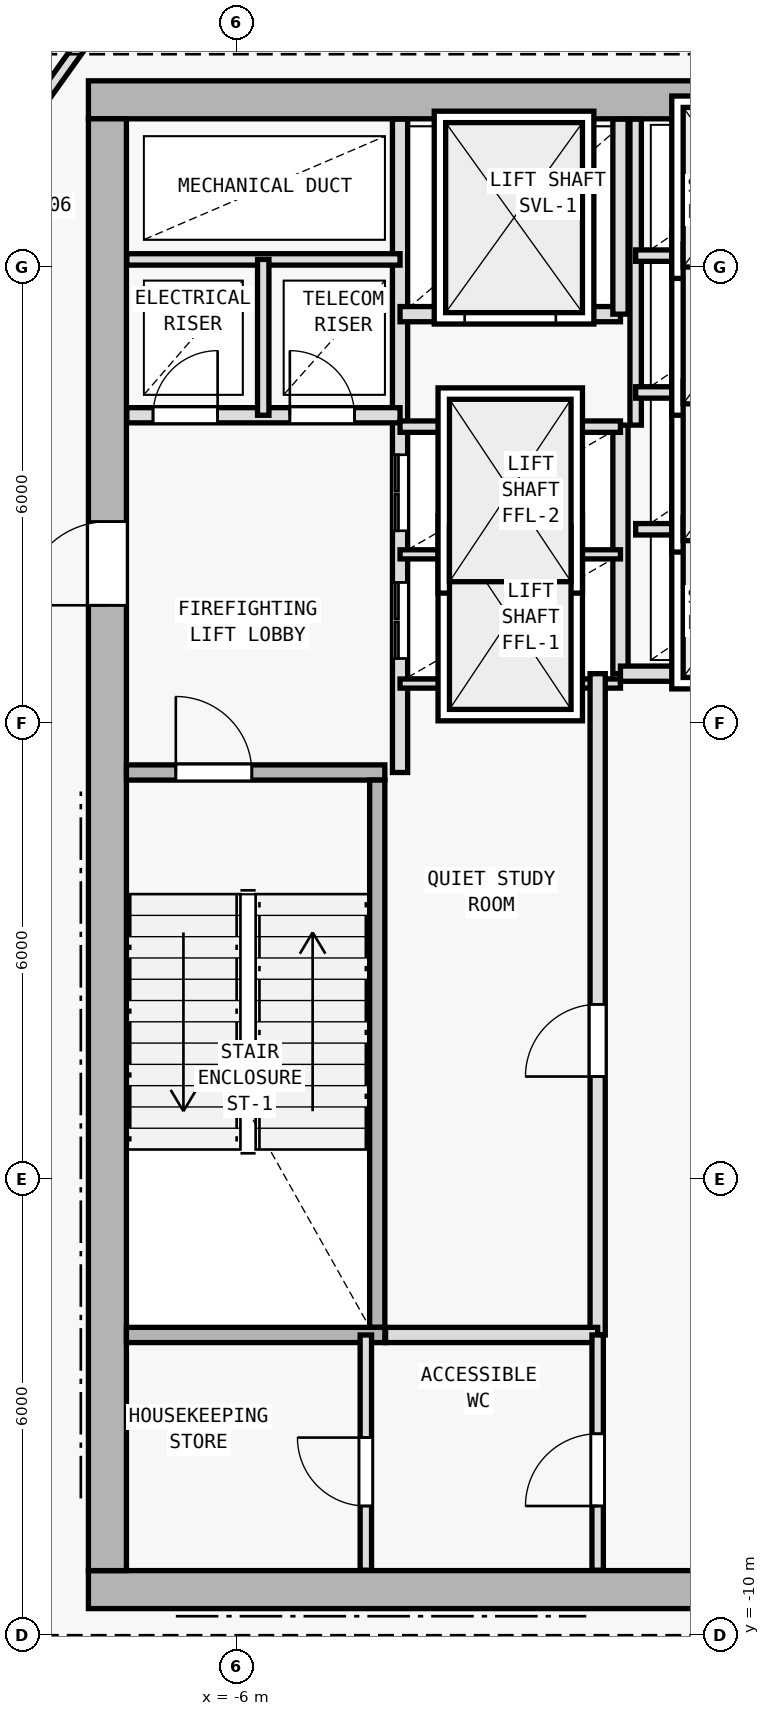
"""IFC4 building model, lengths in metres.
Left out: names, types, materials, properties, quantities, classifications, styles, units other than length and angle.
Written with IfcOpenShell. Run it as: python <this file> out.ifc"""

import sys

from ifc_helpers import new_model, si_unit, direction, frame, frame_2d, origin, origin_2d, place, context, subcontext, project, spatial, rectangle, i_section, extrude, element, fill, save


model = new_model("IFC4")
c1 = context("Model", 3, precision=1e-05, world=origin(), true_north=direction((0.0, 1.0)))
c2 = subcontext(c1, "Body", "Model", "MODEL_VIEW")
j1 = project(units=[si_unit("LENGTHUNIT", "METRE"), si_unit("PLANEANGLEUNIT", "RADIAN")], contexts=[c1])
p1 = place(None, origin())
s1 = spatial("IfcSite", under=j1, at=p1, CompositionType="ELEMENT")
p2 = place(p1, origin())
s2 = spatial("IfcBuilding", under=s1, at=p2, CompositionType="ELEMENT")
p3 = place(p2, frame((0.0, 0.0, 246.3)))
s3 = spatial("IfcBuildingStorey", under=s2, at=p3, CompositionType="ELEMENT", Elevation=246.3)
for number, where, z_axis, x_axis in (
    (1, (-7.7, -9.4, 0.0), (0.0, 0.0, 1.0), (1.0, 0.0, 0.0)),
    (2, (-7.7, 10.2, 0.0), (0.0, 0.0, 1.0), (1.0, 0.0, 0.0)),
    (3, (0.0, -9.4, 0.0), (0.0, 0.0, 1.0), (1.0, 0.0, 0.0)),
    (4, (-7.7, 2.0, 0.0), (0.0, 0.0, 1.0), (1.0, 0.0, 0.0)),
):
    element("IfcColumn", number, at=place(p3, frame(where, z_axis=z_axis, x_axis=x_axis)), inside=s3, PredefinedType="COLUMN", context=c2, shape_type="SweptSolid", body=[
        extrude(i_section(OverallWidth=0.398, OverallDepth=0.387, WebThickness=0.013, FlangeThickness=0.022, FilletRadius=0.015, at=origin_2d()), origin(), (0.0, 0.0, 1.0), 4.5),
    ])
p4 = place(p3, frame((-7.95, -9.4, 0.0), z_axis=(0.0, 0.0, 1.0), x_axis=(1.0, 0.0, 0.0)))
e5 = element("IfcWall", 5, at=p4, inside=s3, PredefinedType="SHEAR", context=c2, shape_type="SweptSolid", body=[
    extrude(rectangle(XDim=15.9, YDim=0.5, at=frame_2d((7.95, 0.0))), origin(), (0.0, 0.0, 1.0), 4.25),
])
p5 = place(p4, frame((9.6, 0.0, 0.0)))
e6 = element("IfcOpeningElement", 6, at=p5, cuts=e5, PredefinedType="OPENING", context=c2, shape_type="SweptSolid", body=[
    extrude(rectangle(XDim=1.5, YDim=2.2, at=frame_2d((0.75, 1.1))), frame((0.0, 0.26, 0.0), z_axis=(0.0, -1.0, 0.0), x_axis=(1.0, 0.0, 0.0)), (0.0, 0.0, 1.0), 0.52),
])
p6 = place(p3, frame((7.95, 10.2, 0.0), z_axis=(0.0, 0.0, 1.0), x_axis=(-1.0, 0.0, 0.0)))
e7 = element("IfcWall", 7, at=p6, inside=s3, PredefinedType="SHEAR", context=c2, shape_type="SweptSolid", body=[
    extrude(rectangle(XDim=15.9, YDim=0.5, at=frame_2d((7.95, 0.0))), origin(), (0.0, 0.0, 1.0), 4.25),
])
p7 = place(p6, frame((4.4, 0.0, 0.0)))
e8 = element("IfcOpeningElement", 8, at=p7, cuts=e7, PredefinedType="OPENING", context=c2, shape_type="SweptSolid", body=[
    extrude(rectangle(XDim=1.1, YDim=2.15, at=frame_2d((0.55, 1.075))), frame((0.0, 0.26, 0.0), z_axis=(0.0, -1.0, 0.0), x_axis=(1.0, 0.0, 0.0)), (0.0, 0.0, 1.0), 0.52),
])
p8 = place(p3, frame((-7.7, -9.15, 0.0), z_axis=(0.0, 0.0, 1.0), x_axis=(0.0, 1.0, 0.0)))
e9 = element("IfcWall", 9, at=p8, inside=s3, PredefinedType="SHEAR", context=c2, shape_type="SweptSolid", body=[
    extrude(rectangle(XDim=19.1, YDim=0.5, at=frame_2d((9.55, 0.0))), origin(), (0.0, 0.0, 1.0), 4.25),
])
p9 = place(p8, frame((12.7, 0.0, 0.0)))
e10 = element("IfcOpeningElement", 10, at=p9, cuts=e9, PredefinedType="OPENING", context=c2, shape_type="SweptSolid", body=[
    extrude(rectangle(XDim=1.1, YDim=2.15, at=frame_2d((0.55, 1.075))), frame((0.0, 0.26, 0.0), z_axis=(0.0, -1.0, 0.0), x_axis=(1.0, 0.0, 0.0)), (0.0, 0.0, 1.0), 0.52),
])
p10 = place(p3, frame((-7.45, 1.35, 0.0), z_axis=(0.0, 0.0, 1.0), x_axis=(1.0, 0.0, 0.0)))
e11 = element("IfcWall", 11, at=p10, inside=s3, PredefinedType="SOLIDWALL", context=c2, shape_type="SweptSolid", body=[
    extrude(rectangle(XDim=3.4, YDim=0.2, at=frame_2d((1.7, 0.0))), origin(), (0.0, 0.0, 1.0), 4.25),
])
p11 = place(p10, frame((0.65, 0.0, 0.0)))
e12 = element("IfcOpeningElement", 12, at=p11, cuts=e11, PredefinedType="OPENING", context=c2, shape_type="SweptSolid", body=[
    extrude(rectangle(XDim=1.0, YDim=2.15, at=frame_2d((0.5, 1.075))), frame((0.0, 0.11, 0.0), z_axis=(0.0, -1.0, 0.0), x_axis=(1.0, 0.0, 0.0)), (0.0, 0.0, 1.0), 0.22),
])
p12 = place(p3, frame((-4.15, -5.95, 0.0), z_axis=(0.0, 0.0, 1.0), x_axis=(0.0, 1.0, 0.0)))
e13 = element("IfcWall", 13, at=p12, inside=s3, PredefinedType="SOLIDWALL", context=c2, shape_type="SweptSolid", body=[
    extrude(rectangle(XDim=7.2, YDim=0.2, at=frame_2d((3.6, 0.0))), origin(), (0.0, 0.0, 1.0), 4.25),
])
p13 = place(p3, frame((-3.85, 1.35, 0.0), z_axis=(0.0, 0.0, 1.0), x_axis=(0.0, 1.0, 0.0)))
e14 = element("IfcWall", 14, at=p13, inside=s3, PredefinedType="SOLIDWALL", context=c2, shape_type="SweptSolid", body=[
    extrude(rectangle(XDim=8.595, YDim=0.2, at=frame_2d((4.297, 0.0))), origin(), (0.0, 0.0, 1.0), 4.25),
])
p14 = place(p13, frame((1.5, 0.0, 0.0)))
e15 = element("IfcOpeningElement", 15, at=p14, cuts=e14, PredefinedType="OPENING", context=c2, shape_type="SweptSolid", body=[
    extrude(rectangle(XDim=1.0, YDim=2.15, at=frame_2d((0.5, 1.075))), frame((0.0, 0.11, 0.0), z_axis=(0.0, -1.0, 0.0), x_axis=(1.0, 0.0, 0.0)), (0.0, 0.0, 1.0), 0.22),
])
p15 = place(p13, frame((3.18, 0.0, 0.0)))
e16 = element("IfcOpeningElement", 16, at=p15, cuts=e14, PredefinedType="OPENING", context=c2, shape_type="SweptSolid", body=[
    extrude(rectangle(XDim=1.0, YDim=2.15, at=frame_2d((0.5, 1.075))), frame((0.0, 0.11, 0.0), z_axis=(0.0, -1.0, 0.0), x_axis=(1.0, 0.0, 0.0)), (0.0, 0.0, 1.0), 0.22),
])
p16 = place(p3, frame((-7.445, 6.05, 0.0), z_axis=(0.0, 0.0, 1.0), x_axis=(1.0, 0.0, 0.0)))
e17 = element("IfcWall", 17, at=p16, inside=s3, PredefinedType="SOLIDWALL", context=c2, shape_type="SweptSolid", body=[
    extrude(rectangle(XDim=3.595, YDim=0.2, at=frame_2d((1.797, 0.0))), origin(), (0.0, 0.0, 1.0), 4.25),
])
p17 = place(p16, frame((0.345, 0.0, 0.0)))
e18 = element("IfcOpeningElement", 18, at=p17, cuts=e17, PredefinedType="OPENING", context=c2, shape_type="SweptSolid", body=[
    extrude(rectangle(XDim=0.85, YDim=2.1, at=frame_2d((0.425, 1.05))), frame((0.0, 0.11, 0.0), z_axis=(0.0, -1.0, 0.0), x_axis=(1.0, 0.0, 0.0)), (0.0, 0.0, 1.0), 0.22),
])
p18 = place(p16, frame((2.145, 0.0, 0.0)))
e19 = element("IfcOpeningElement", 19, at=p18, cuts=e17, PredefinedType="OPENING", context=c2, shape_type="SweptSolid", body=[
    extrude(rectangle(XDim=0.85, YDim=2.1, at=frame_2d((0.425, 1.05))), frame((0.0, 0.11, 0.0), z_axis=(0.0, -1.0, 0.0), x_axis=(1.0, 0.0, 0.0)), (0.0, 0.0, 1.0), 0.22),
])
p19 = place(p3, frame((-7.445, 8.1, 0.0), z_axis=(0.0, 0.0, 1.0), x_axis=(1.0, 0.0, 0.0)))
e20 = element("IfcWall", 20, at=p19, inside=s3, PredefinedType="PARTITIONING", context=c2, shape_type="SweptSolid", body=[
    extrude(rectangle(XDim=3.595, YDim=0.15, at=frame_2d((1.797, 0.0))), origin(), (0.0, 0.0, 1.0), 4.25),
])
p20 = place(p3, frame((-5.65, 6.05, 0.0), z_axis=(0.0, 0.0, 1.0), x_axis=(0.0, 1.0, 0.0)))
e21 = element("IfcWall", 21, at=p20, inside=s3, PredefinedType="PARTITIONING", context=c2, shape_type="SweptSolid", body=[
    extrude(rectangle(XDim=2.05, YDim=0.15, at=frame_2d((1.025, 0.0))), origin(), (0.0, 0.0, 1.0), 4.25),
])
p21 = place(p3, frame((-0.95, 2.65, 0.0), z_axis=(0.0, 0.0, 1.0), x_axis=(0.0, 1.0, 0.0)))
e22 = element("IfcWall", 22, at=p21, inside=s3, PredefinedType="SOLIDWALL", context=c2, shape_type="SweptSolid", body=[
    extrude(rectangle(XDim=3.27, YDim=0.2, at=frame_2d((1.635, 0.0))), origin(), (0.0, 0.0, 1.0), 4.25),
])
for number, where, z_axis, x_axis in (
    (23, (-3.85, 2.52, 0.0), (0.0, 0.0, 1.0), (1.0, 0.0, 0.0)),
    (24, (-3.85, 4.22, 0.0), (0.0, 0.0, 1.0), (1.0, 0.0, 0.0)),
):
    element("IfcWall", number, at=place(p3, frame(where, z_axis=z_axis, x_axis=x_axis)), inside=s3, PredefinedType="PARTITIONING", context=c2, shape_type="SweptSolid", body=[
        extrude(rectangle(XDim=2.9, YDim=0.12, at=frame_2d((1.45, 0.0))), origin(), (0.0, 0.0, 1.0), 4.25),
    ])
p22 = place(p3, frame((-3.85, 5.9, 0.0), z_axis=(0.0, 0.0, 1.0), x_axis=(1.0, 0.0, 0.0)))
e25 = element("IfcWall", 25, at=p22, inside=s3, PredefinedType="PARTITIONING", context=c2, shape_type="SweptSolid", body=[
    extrude(rectangle(XDim=2.9, YDim=0.15, at=frame_2d((1.45, 0.0))), origin(), (0.0, 0.0, 1.0), 4.25),
])
p23 = place(p3, frame((-3.85, 7.38, 0.0), z_axis=(0.0, 0.0, 1.0), x_axis=(1.0, 0.0, 0.0)))
e26 = element("IfcWall", 26, at=p23, inside=s3, PredefinedType="SOLIDWALL", context=c2, shape_type="SweptSolid", body=[
    extrude(rectangle(XDim=2.9, YDim=0.2, at=frame_2d((1.45, 0.0))), origin(), (0.0, 0.0, 1.0), 4.25),
])
p24 = place(p23, frame((0.85, 0.0, 0.0)))
e27 = element("IfcOpeningElement", 27, at=p24, cuts=e26, PredefinedType="OPENING", context=c2, shape_type="SweptSolid", body=[
    extrude(rectangle(XDim=1.2, YDim=2.2, at=frame_2d((0.6, 1.1))), frame((0.0, 0.11, 0.0), z_axis=(0.0, -1.0, 0.0), x_axis=(1.0, 0.0, 0.0)), (0.0, 0.0, 1.0), 0.22),
])
p25 = place(p3, frame((-0.95, 7.38, 0.0), z_axis=(0.0, 0.0, 1.0), x_axis=(0.0, 1.0, 0.0)))
e28 = element("IfcWall", 28, at=p25, inside=s3, PredefinedType="SOLIDWALL", context=c2, shape_type="SweptSolid", body=[
    extrude(rectangle(XDim=2.565, YDim=0.2, at=frame_2d((1.283, 0.0))), origin(), (0.0, 0.0, 1.0), 4.25),
])
p26 = place(p3, frame((-1.25, -6.05, 0.0), z_axis=(0.0, 0.0, 1.0), x_axis=(0.0, 1.0, 0.0)))
e29 = element("IfcWall", 29, at=p26, inside=s3, PredefinedType="SOLIDWALL", context=c2, shape_type="SweptSolid", body=[
    extrude(rectangle(XDim=8.7, YDim=0.2, at=frame_2d((4.35, 0.0))), origin(), (0.0, 0.0, 1.0), 4.25),
])
p27 = place(p26, frame((3.4, 0.0, 0.0)))
e30 = element("IfcOpeningElement", 30, at=p27, cuts=e29, PredefinedType="OPENING", context=c2, shape_type="SweptSolid", body=[
    extrude(rectangle(XDim=0.95, YDim=2.1, at=frame_2d((0.475, 1.05))), frame((0.0, 0.11, 0.0), z_axis=(0.0, -1.0, 0.0), x_axis=(1.0, 0.0, 0.0)), (0.0, 0.0, 1.0), 0.22),
])
p28 = place(p3, frame((-0.95, 2.65, 0.0), z_axis=(0.0, 0.0, 1.0), x_axis=(1.0, 0.0, 0.0)))
e31 = element("IfcWall", 31, at=p28, inside=s3, PredefinedType="SOLIDWALL", context=c2, shape_type="SweptSolid", body=[
    extrude(rectangle(XDim=2.9, YDim=0.2, at=frame_2d((1.45, 0.0))), origin(), (0.0, 0.0, 1.0), 4.25),
])
p29 = place(p3, frame((-0.75, 5.92, 0.0), z_axis=(0.0, 0.0, 1.0), x_axis=(0.0, 1.0, 0.0)))
e32 = element("IfcWall", 32, at=p29, inside=s3, PredefinedType="PARTITIONING", context=c2, shape_type="SweptSolid", body=[
    extrude(rectangle(XDim=4.025, YDim=0.15, at=frame_2d((2.013, 0.0))), origin(), (0.0, 0.0, 1.0), 4.25),
])
for number, where, z_axis, x_axis in (
    (33, (-0.75, 4.55, 0.0), (0.0, 0.0, 1.0), (1.0, 0.0, 0.0)),
    (34, (-0.75, 6.35, 0.0), (0.0, 0.0, 1.0), (1.0, 0.0, 0.0)),
    (35, (-0.75, 8.15, 0.0), (0.0, 0.0, 1.0), (1.0, 0.0, 0.0)),
):
    element("IfcWall", number, at=place(p3, frame(where, z_axis=z_axis, x_axis=x_axis)), inside=s3, PredefinedType="PARTITIONING", context=c2, shape_type="SweptSolid", body=[
        extrude(rectangle(XDim=2.7, YDim=0.15, at=frame_2d((1.35, 0.0))), origin(), (0.0, 0.0, 1.0), 4.25),
    ])
p30 = place(p3, frame((-7.45, -6.05, 0.0), z_axis=(0.0, 0.0, 1.0), x_axis=(1.0, 0.0, 0.0)))
e36 = element("IfcWall", 36, at=p30, inside=s3, PredefinedType="SOLIDWALL", context=c2, shape_type="SweptSolid", body=[
    extrude(rectangle(XDim=3.4, YDim=0.2, at=frame_2d((1.7, 0.0))), origin(), (0.0, 0.0, 1.0), 4.25),
])
p31 = place(p3, frame((-4.04, -6.05, 0.0), z_axis=(0.0, 0.0, 1.0), x_axis=(1.0, 0.0, 0.0)))
e37 = element("IfcWall", 37, at=p31, inside=s3, PredefinedType="SOLIDWALL", context=c2, shape_type="SweptSolid", body=[
    extrude(rectangle(XDim=2.79, YDim=0.2, at=frame_2d((1.395, 0.0))), origin(), (0.0, 0.0, 1.0), 4.25),
])
p32 = place(p3, frame((-1.25, -9.145, 0.0), z_axis=(0.0, 0.0, 1.0), x_axis=(0.0, 1.0, 0.0)))
e38 = element("IfcWall", 38, at=p32, inside=s3, PredefinedType="PARTITIONING", context=c2, shape_type="SweptSolid", body=[
    extrude(rectangle(XDim=3.095, YDim=0.15, at=frame_2d((1.547, 0.0))), origin(), (0.0, 0.0, 1.0), 4.25),
])
p33 = place(p32, frame((0.845, 0.0, 0.0)))
e39 = element("IfcOpeningElement", 39, at=p33, cuts=e38, PredefinedType="OPENING", context=c2, shape_type="SweptSolid", body=[
    extrude(rectangle(XDim=0.95, YDim=2.1, at=frame_2d((0.475, 1.05))), frame((0.0, 0.085, 0.0), z_axis=(0.0, -1.0, 0.0), x_axis=(1.0, 0.0, 0.0)), (0.0, 0.0, 1.0), 0.17),
])
p34 = place(p3, frame((-4.3, -9.145, 0.0), z_axis=(0.0, 0.0, 1.0), x_axis=(0.0, 1.0, 0.0)))
e40 = element("IfcWall", 40, at=p34, inside=s3, PredefinedType="PARTITIONING", context=c2, shape_type="SweptSolid", body=[
    extrude(rectangle(XDim=3.095, YDim=0.15, at=frame_2d((1.547, 0.0))), origin(), (0.0, 0.0, 1.0), 4.25),
])
p35 = place(p34, frame((0.845, 0.0, 0.0)))
e41 = element("IfcOpeningElement", 41, at=p35, cuts=e40, PredefinedType="OPENING", context=c2, shape_type="SweptSolid", body=[
    extrude(rectangle(XDim=0.9, YDim=2.1, at=frame_2d((0.45, 1.05))), frame((0.0, 0.085, 0.0), z_axis=(0.0, -1.0, 0.0), x_axis=(1.0, 0.0, 0.0)), (0.0, 0.0, 1.0), 0.17),
])
p36 = place(p3, frame((-9.83, 8.426, 0.0), z_axis=(0.0, 0.0, 1.0), x_axis=(0.581218941111, 0.813747222725, 0.0)))
e42 = element("IfcWall", 42, at=p36, inside=s3, PredefinedType="PARTITIONING", context=c2, shape_type="SweptSolid", body=[
    extrude(rectangle(XDim=4.798, YDim=0.15, at=frame_2d((2.399, 0.0))), origin(), (0.0, 0.0, 1.0), 3.875),
])
p37 = place(p36, frame((1.049, 0.0, 0.0)))
e43 = element("IfcOpeningElement", 43, at=p37, cuts=e42, PredefinedType="OPENING", context=c2, shape_type="SweptSolid", body=[
    extrude(rectangle(XDim=0.9, YDim=2.1, at=frame_2d((0.45, 1.05))), frame((0.0, 0.085, 0.0), z_axis=(0.0, -1.0, 0.0), x_axis=(1.0, 0.0, 0.0)), (0.0, 0.0, 1.0), 0.17),
])
p38 = place(p9, origin())
e44 = element("IfcDoor", 44, at=p38, inside=s3, OperationType="SINGLE_SWING_LEFT", PredefinedType="DOOR", context=c2, shape_type="SweptSolid", body=[
    extrude(rectangle(XDim=1.1, YDim=2.15, at=frame_2d((0.55, 1.075))), frame((0.0, 0.025, 0.0), z_axis=(0.0, -1.0, 0.0), x_axis=(1.0, 0.0, 0.0)), (0.0, 0.0, 1.0), 0.05),
])
fill(e10, e44)
p39 = place(p11, origin())
e45 = element("IfcDoor", 45, at=p39, inside=s3, OperationType="SINGLE_SWING_LEFT", PredefinedType="DOOR", context=c2, shape_type="SweptSolid", body=[
    extrude(rectangle(XDim=1.0, YDim=2.15, at=frame_2d((0.5, 1.075))), frame((0.0, 0.025, 0.0), z_axis=(0.0, -1.0, 0.0), x_axis=(1.0, 0.0, 0.0)), (0.0, 0.0, 1.0), 0.05),
])
fill(e12, e45)
p40 = place(p17, origin())
e46 = element("IfcDoor", 46, at=p40, inside=s3, OperationType="SINGLE_SWING_RIGHT", PredefinedType="DOOR", context=c2, shape_type="SweptSolid", body=[
    extrude(rectangle(XDim=0.85, YDim=2.1, at=frame_2d((0.425, 1.05))), frame((0.0, 0.025, 0.0), z_axis=(0.0, -1.0, 0.0), x_axis=(1.0, 0.0, 0.0)), (0.0, 0.0, 1.0), 0.05),
])
fill(e18, e46)
p41 = place(p18, origin())
e47 = element("IfcDoor", 47, at=p41, inside=s3, OperationType="SINGLE_SWING_LEFT", PredefinedType="DOOR", context=c2, shape_type="SweptSolid", body=[
    extrude(rectangle(XDim=0.85, YDim=2.1, at=frame_2d((0.425, 1.05))), frame((0.0, 0.025, 0.0), z_axis=(0.0, -1.0, 0.0), x_axis=(1.0, 0.0, 0.0)), (0.0, 0.0, 1.0), 0.05),
])
fill(e19, e47)
p42 = place(p24, origin())
e48 = element("IfcDoor", 48, at=p42, inside=s3, OperationType="DOUBLE_DOOR_SLIDING", PredefinedType="DOOR", context=c2, shape_type="SweptSolid", body=[
    extrude(rectangle(XDim=1.2, YDim=2.2, at=frame_2d((0.6, 1.1))), frame((0.0, 0.025, 0.0), z_axis=(0.0, -1.0, 0.0), x_axis=(1.0, 0.0, 0.0)), (0.0, 0.0, 1.0), 0.05),
])
fill(e27, e48)
p43 = place(p27, origin())
e49 = element("IfcDoor", 49, at=p43, inside=s3, OperationType="SINGLE_SWING_LEFT", PredefinedType="DOOR", context=c2, shape_type="SweptSolid", body=[
    extrude(rectangle(XDim=0.95, YDim=2.1, at=frame_2d((0.475, 1.05))), frame((0.0, 0.025, 0.0), z_axis=(0.0, -1.0, 0.0), x_axis=(1.0, 0.0, 0.0)), (0.0, 0.0, 1.0), 0.05),
])
fill(e30, e49)
p44 = place(p14, origin())
e50 = element("IfcDoor", 50, at=p44, inside=s3, OperationType="DOUBLE_DOOR_SLIDING", PredefinedType="DOOR", context=c2, shape_type="SweptSolid", body=[
    extrude(rectangle(XDim=1.0, YDim=2.15, at=frame_2d((0.5, 1.075))), frame((0.0, 0.025, 0.0), z_axis=(0.0, -1.0, 0.0), x_axis=(1.0, 0.0, 0.0)), (0.0, 0.0, 1.0), 0.05),
])
fill(e15, e50)
p45 = place(p15, origin())
e51 = element("IfcDoor", 51, at=p45, inside=s3, OperationType="DOUBLE_DOOR_SLIDING", PredefinedType="DOOR", context=c2, shape_type="SweptSolid", body=[
    extrude(rectangle(XDim=1.0, YDim=2.15, at=frame_2d((0.5, 1.075))), frame((0.0, 0.025, 0.0), z_axis=(0.0, -1.0, 0.0), x_axis=(1.0, 0.0, 0.0)), (0.0, 0.0, 1.0), 0.05),
])
fill(e16, e51)
p46 = place(p33, origin())
e52 = element("IfcDoor", 52, at=p46, inside=s3, OperationType="SINGLE_SWING_LEFT", PredefinedType="DOOR", context=c2, shape_type="SweptSolid", body=[
    extrude(rectangle(XDim=0.95, YDim=2.1, at=frame_2d((0.475, 1.05))), frame((0.0, 0.025, 0.0), z_axis=(0.0, -1.0, 0.0), x_axis=(1.0, 0.0, 0.0)), (0.0, 0.0, 1.0), 0.05),
])
fill(e39, e52)
p47 = place(p35, origin())
e53 = element("IfcDoor", 53, at=p47, inside=s3, OperationType="SINGLE_SWING_RIGHT", PredefinedType="DOOR", context=c2, shape_type="SweptSolid", body=[
    extrude(rectangle(XDim=0.9, YDim=2.1, at=frame_2d((0.45, 1.05))), frame((0.0, 0.025, 0.0), z_axis=(0.0, -1.0, 0.0), x_axis=(1.0, 0.0, 0.0)), (0.0, 0.0, 1.0), 0.05),
])
fill(e41, e53)
save(model, sys.argv[1])
